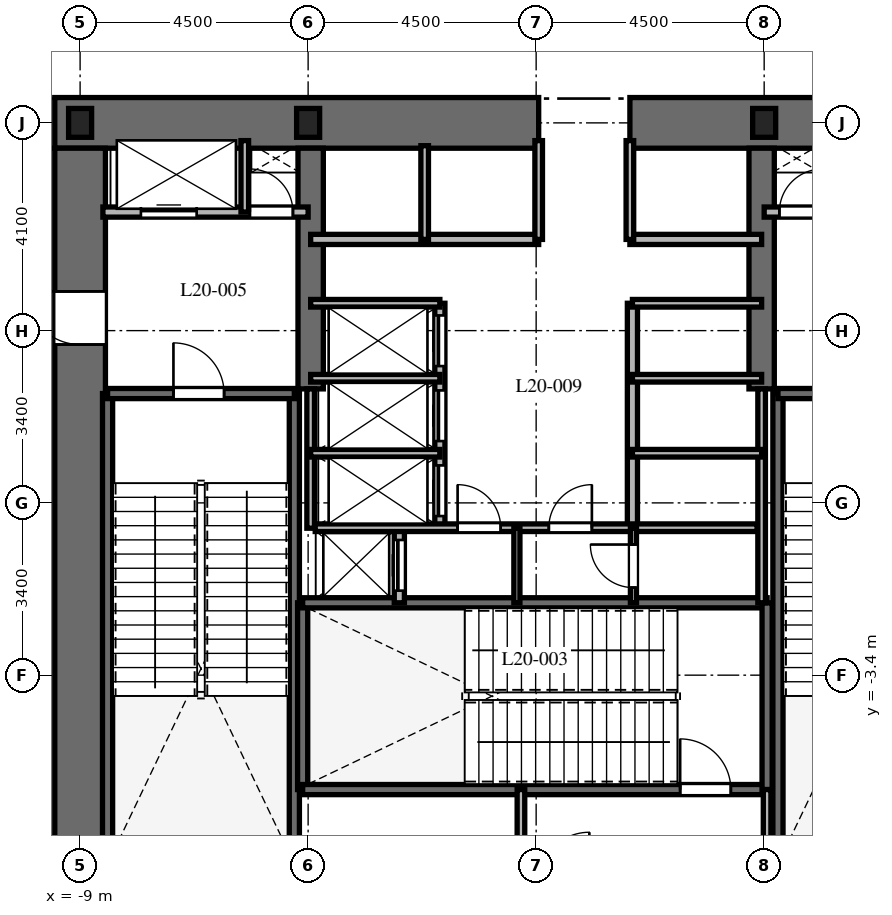
"""IFC4 building model, lengths in metres.
Left out: names, types, materials, properties, quantities, classifications, styles, units other than length and angle.
Written with IfcOpenShell. Run it as: python <this file> out.ifc"""

import sys

from ifc_helpers import new_model, si_unit, direction, frame, frame_2d, origin, origin_2d, place, context, subcontext, project, spatial, rectangle, i_section, extrude, element, fill, save


model = new_model("IFC4")
c1 = context("Model", 3, precision=1e-05, world=origin(), true_north=direction((0.0, 1.0)))
c2 = subcontext(c1, "Body", "Model", "MODEL_VIEW")
j1 = project(units=[si_unit("LENGTHUNIT", "METRE"), si_unit("PLANEANGLEUNIT", "RADIAN")], contexts=[c1])
p1 = place(None, origin())
s1 = spatial("IfcSite", under=j1, at=p1, CompositionType="ELEMENT")
p2 = place(p1, origin())
s2 = spatial("IfcBuilding", under=s1, at=p2, CompositionType="ELEMENT")
p3 = place(p2, frame((0.0, 0.0, 86.0)))
s3 = spatial("IfcBuildingStorey", under=s2, at=p3, CompositionType="ELEMENT", Elevation=86.0)
p4 = place(p3, frame((-9.5, 7.5, 0.0), z_axis=(0.0, 0.0, 1.0), x_axis=(1.0, 0.0, 0.0)))
e1 = element("IfcWall", 1, at=p4, inside=s3, PredefinedType="SHEAR", context=c2, shape_type="SweptSolid", body=[
    extrude(rectangle(XDim=9.55, YDim=1.0, at=frame_2d((4.775, 0.0))), origin(), (0.0, 0.0, 1.0), 5.4),
])
p5 = place(p3, frame((1.85, 7.5, 0.0), z_axis=(0.0, 0.0, 1.0), x_axis=(1.0, 0.0, 0.0)))
e2 = element("IfcWall", 2, at=p5, inside=s3, PredefinedType="SHEAR", context=c2, shape_type="SweptSolid", body=[
    extrude(rectangle(XDim=7.65, YDim=1.0, at=frame_2d((3.825, 0.0))), origin(), (0.0, 0.0, 1.0), 5.4),
])
p6 = place(p3, frame((-9.0, -7.0, 0.0), z_axis=(0.0, 0.0, 1.0), x_axis=(0.0, 1.0, 0.0)))
e3 = element("IfcWall", 3, at=p6, inside=s3, PredefinedType="SHEAR", context=c2, shape_type="SweptSolid", body=[
    extrude(rectangle(XDim=14.0, YDim=1.0, at=frame_2d((7.0, 0.0))), origin(), (0.0, 0.0, 1.0), 5.4),
])
p7 = place(p6, frame((10.125, 0.0, 0.0)))
e4 = element("IfcOpeningElement", 4, at=p7, cuts=e3, PredefinedType="OPENING", context=c2, shape_type="SweptSolid", body=[
    extrude(rectangle(XDim=1.05, YDim=2.15, at=frame_2d((0.525, 1.075))), frame((0.0, 0.51, 0.0), z_axis=(0.0, -1.0, 0.0), x_axis=(1.0, 0.0, 0.0)), (0.0, 0.0, 1.0), 1.02),
])
for number, where, z_axis, x_axis in (
    (5, (-4.45, 2.25, 0.0), (0.0, 0.0, 1.0), (0.0, 1.0, 0.0)),
    (6, (4.45, 2.25, 0.0), (0.0, 0.0, 1.0), (0.0, 1.0, 0.0)),
):
    element("IfcWall", number, at=place(p3, frame(where, z_axis=z_axis, x_axis=x_axis)), inside=s3, PredefinedType="SHEAR", context=c2, shape_type="SweptSolid", body=[
        extrude(rectangle(XDim=4.75, YDim=0.5, at=frame_2d((2.375, 0.0))), origin(), (0.0, 0.0, 1.0), 5.4),
    ])
for number, where, z_axis, x_axis in (
    (7, (-8.458, -6.985, 0.0), (0.0, 0.0, 1.0), (0.0, 1.0, 0.0)),
    (8, (-4.772, -6.985, 0.0), (0.0, 0.0, 1.0), (0.0, 1.0, 0.0)),
):
    element("IfcWall", number, at=place(p3, frame(where, z_axis=z_axis, x_axis=x_axis)), inside=s3, PredefinedType="SHEAR", context=c2, shape_type="SweptSolid", body=[
        extrude(rectangle(XDim=9.143, YDim=0.2, at=frame_2d((4.572, 0.0))), origin(), (0.0, 0.0, 1.0), 5.4),
    ])
p8 = place(p3, frame((-8.458, 2.158, 0.0), z_axis=(0.0, 0.0, 1.0), x_axis=(1.0, 0.0, 0.0)))
e9 = element("IfcWall", 9, at=p8, inside=s3, PredefinedType="SHEAR", context=c2, shape_type="SweptSolid", body=[
    extrude(rectangle(XDim=3.686, YDim=0.2, at=frame_2d((1.843, 0.0))), origin(), (0.0, 0.0, 1.0), 5.4),
])
p9 = place(p8, frame((1.3, 0.0, 0.0)))
e10 = element("IfcOpeningElement", 10, at=p9, cuts=e9, PredefinedType="OPENING", context=c2, shape_type="SweptSolid", body=[
    extrude(rectangle(XDim=1.0, YDim=2.15, at=frame_2d((0.5, 1.075))), frame((0.0, 0.11, 0.0), z_axis=(0.0, -1.0, 0.0), x_axis=(1.0, 0.0, 0.0)), (0.0, 0.0, 1.0), 0.22),
])
p10 = place(p3, frame((4.772, -6.985, 0.0), z_axis=(0.0, 0.0, 1.0), x_axis=(0.0, 1.0, 0.0)))
e11 = element("IfcWall", 11, at=p10, inside=s3, PredefinedType="SHEAR", context=c2, shape_type="SweptSolid", body=[
    extrude(rectangle(XDim=9.143, YDim=0.2, at=frame_2d((4.572, 0.0))), origin(), (0.0, 0.0, 1.0), 5.4),
])
p11 = place(p3, frame((4.772, 2.158, 0.0), z_axis=(0.0, 0.0, 1.0), x_axis=(1.0, 0.0, 0.0)))
e12 = element("IfcWall", 12, at=p11, inside=s3, PredefinedType="SHEAR", context=c2, shape_type="SweptSolid", body=[
    extrude(rectangle(XDim=3.686, YDim=0.2, at=frame_2d((1.843, 0.0))), origin(), (0.0, 0.0, 1.0), 5.4),
])
p12 = place(p11, frame((1.35, 0.0, 0.0)))
e13 = element("IfcOpeningElement", 13, at=p12, cuts=e12, PredefinedType="OPENING", context=c2, shape_type="SweptSolid", body=[
    extrude(rectangle(XDim=1.0, YDim=2.15, at=frame_2d((0.5, 1.075))), frame((0.0, 0.11, 0.0), z_axis=(0.0, -1.0, 0.0), x_axis=(1.0, 0.0, 0.0)), (0.0, 0.0, 1.0), 0.22),
])
p13 = place(p3, frame((-4.608, -5.658, 0.0), z_axis=(0.0, 0.0, 1.0), x_axis=(0.0, 1.0, 0.0)))
e14 = element("IfcWall", 14, at=p13, inside=s3, PredefinedType="SHEAR", context=c2, shape_type="SweptSolid", body=[
    extrude(rectangle(XDim=3.686, YDim=0.2, at=frame_2d((1.843, 0.0))), origin(), (0.0, 0.0, 1.0), 5.4),
])
p14 = place(p3, frame((-4.608, -5.658, 0.0), z_axis=(0.0, 0.0, 1.0), x_axis=(1.0, 0.0, 0.0)))
e15 = element("IfcWall", 15, at=p14, inside=s3, PredefinedType="SHEAR", context=c2, shape_type="SweptSolid", body=[
    extrude(rectangle(XDim=9.166, YDim=0.2, at=frame_2d((4.583, 0.0))), origin(), (0.0, 0.0, 1.0), 5.4),
])
p15 = place(p14, frame((7.45, 0.0, 0.0)))
e16 = element("IfcOpeningElement", 16, at=p15, cuts=e15, PredefinedType="OPENING", context=c2, shape_type="SweptSolid", body=[
    extrude(rectangle(XDim=1.0, YDim=2.15, at=frame_2d((0.5, 1.075))), frame((0.0, 0.11, 0.0), z_axis=(0.0, -1.0, 0.0), x_axis=(1.0, 0.0, 0.0)), (0.0, 0.0, 1.0), 0.22),
])
p16 = place(p3, frame((-4.608, -1.972, 0.0), z_axis=(0.0, 0.0, 1.0), x_axis=(1.0, 0.0, 0.0)))
e17 = element("IfcWall", 17, at=p16, inside=s3, PredefinedType="SHEAR", context=c2, shape_type="SweptSolid", body=[
    extrude(rectangle(XDim=9.166, YDim=0.2, at=frame_2d((4.583, 0.0))), origin(), (0.0, 0.0, 1.0), 5.4),
])
p17 = place(p3, frame((4.558, -5.658, 0.0), z_axis=(0.0, 0.0, 1.0), x_axis=(0.0, 1.0, 0.0)))
e18 = element("IfcWall", 18, at=p17, inside=s3, PredefinedType="SHEAR", context=c2, shape_type="SweptSolid", body=[
    extrude(rectangle(XDim=3.686, YDim=0.2, at=frame_2d((1.843, 0.0))), origin(), (0.0, 0.0, 1.0), 5.4),
])
for number, where, z_axis, x_axis in (
    (19, (4.5, 7.5, 0.0), (0.0, 0.0, 1.0), (1.0, 0.0, 0.0)),
    (20, (-4.5, 7.5, 0.0), (0.0, 0.0, 1.0), (1.0, 0.0, 0.0)),
    (21, (-9.0, 7.5, 0.0), (0.0, 0.0, 1.0), (1.0, 0.0, 0.0)),
):
    element("IfcColumn", number, at=place(p3, frame(where, z_axis=z_axis, x_axis=x_axis)), inside=s3, PredefinedType="COLUMN", context=c2, shape_type="SweptSolid", body=[
        extrude(i_section(OverallWidth=0.454, OverallDepth=0.569, WebThickness=0.078, FlangeThickness=0.125, at=origin_2d()), origin(), (0.0, 0.0, 1.0), 5.4),
    ])
for number, where, z_axis, x_axis in (
    (22, (-0.3, -7.02, 0.0), (0.0, 0.0, 1.0), (0.0, 1.0, 0.0)),
    (23, (4.558, -7.02, 0.0), (0.0, 0.0, 1.0), (0.0, 1.0, 0.0)),
):
    element("IfcWall", number, at=place(p3, frame(where, z_axis=z_axis, x_axis=x_axis)), inside=s3, PredefinedType="PARTITIONING", context=c2, shape_type="SweptSolid", body=[
        extrude(rectangle(XDim=1.362, YDim=0.15, at=frame_2d((0.681, 0.0))), origin(), (0.0, 0.0, 1.0), 5.1),
    ])
p18 = place(p3, frame((-8.55, 5.74, 0.0), z_axis=(0.0, 0.0, 1.0), x_axis=(1.0, 0.0, 0.0)))
e24 = element("IfcWall", 24, at=p18, inside=s3, PredefinedType="PARTITIONING", context=c2, shape_type="SweptSolid", body=[
    extrude(rectangle(XDim=4.05, YDim=0.2, at=frame_2d((2.025, 0.0))), origin(), (0.0, 0.0, 1.0), 5.1),
])
p19 = place(p18, frame((0.75, 0.0, 0.0)))
e25 = element("IfcOpeningElement", 25, at=p19, cuts=e24, PredefinedType="OPENING", context=c2, shape_type="SweptSolid", body=[
    extrude(rectangle(XDim=1.1, YDim=2.2, at=frame_2d((0.55, 1.1))), frame((0.0, 0.11, 0.0), z_axis=(0.0, -1.0, 0.0), x_axis=(1.0, 0.0, 0.0)), (0.0, 0.0, 1.0), 0.22),
])
p20 = place(p18, frame((2.9, 0.0, 0.0)))
e26 = element("IfcOpeningElement", 26, at=p20, cuts=e24, PredefinedType="OPENING", context=c2, shape_type="SweptSolid", body=[
    extrude(rectangle(XDim=0.85, YDim=2.03, at=frame_2d((0.425, 1.015))), frame((0.0, 0.11, 0.0), z_axis=(0.0, -1.0, 0.0), x_axis=(1.0, 0.0, 0.0)), (0.0, 0.0, 1.0), 0.22),
])
p21 = place(p3, frame((-5.75, 5.74, 0.0), z_axis=(0.0, 0.0, 1.0), x_axis=(0.0, 1.0, 0.0)))
e27 = element("IfcWall", 27, at=p21, inside=s3, PredefinedType="PARTITIONING", context=c2, shape_type="SweptSolid", body=[
    extrude(rectangle(XDim=1.41, YDim=0.15, at=frame_2d((0.705, 0.0))), origin(), (0.0, 0.0, 1.0), 5.1),
])
p22 = place(p3, frame((4.5, 5.74, 0.0), z_axis=(0.0, 0.0, 1.0), x_axis=(1.0, 0.0, 0.0)))
e28 = element("IfcWall", 28, at=p22, inside=s3, PredefinedType="PARTITIONING", context=c2, shape_type="SweptSolid", body=[
    extrude(rectangle(XDim=4.05, YDim=0.2, at=frame_2d((2.025, 0.0))), origin(), (0.0, 0.0, 1.0), 5.1),
])
p23 = place(p22, frame((0.3, 0.0, 0.0)))
e29 = element("IfcOpeningElement", 29, at=p23, cuts=e28, PredefinedType="OPENING", context=c2, shape_type="SweptSolid", body=[
    extrude(rectangle(XDim=0.85, YDim=2.03, at=frame_2d((0.425, 1.015))), frame((0.0, 0.11, 0.0), z_axis=(0.0, -1.0, 0.0), x_axis=(1.0, 0.0, 0.0)), (0.0, 0.0, 1.0), 0.22),
])
p24 = place(p22, frame((2.15, 0.0, 0.0)))
e30 = element("IfcOpeningElement", 30, at=p24, cuts=e28, PredefinedType="OPENING", context=c2, shape_type="SweptSolid", body=[
    extrude(rectangle(XDim=1.1, YDim=2.2, at=frame_2d((0.55, 1.1))), frame((0.0, 0.11, 0.0), z_axis=(0.0, -1.0, 0.0), x_axis=(1.0, 0.0, 0.0)), (0.0, 0.0, 1.0), 0.22),
])
p25 = place(p3, frame((-2.7, -1.972, 0.0), z_axis=(0.0, 0.0, 1.0), x_axis=(0.0, 1.0, 0.0)))
e31 = element("IfcWall", 31, at=p25, inside=s3, PredefinedType="PARTITIONING", context=c2, shape_type="SweptSolid", body=[
    extrude(rectangle(XDim=1.472, YDim=0.2, at=frame_2d((0.736, 0.0))), origin(), (0.0, 0.0, 1.0), 5.1),
])
p26 = place(p25, frame((0.24, 0.0, 0.0)))
e32 = element("IfcOpeningElement", 32, at=p26, cuts=e31, PredefinedType="OPENING", context=c2, shape_type="SweptSolid", body=[
    extrude(rectangle(XDim=1.0, YDim=2.2, at=frame_2d((0.5, 1.1))), frame((0.0, 0.11, 0.0), z_axis=(0.0, -1.0, 0.0), x_axis=(1.0, 0.0, 0.0)), (0.0, 0.0, 1.0), 0.22),
])
p27 = place(p3, frame((-4.45, 5.2, 0.0), z_axis=(0.0, 0.0, 1.0), x_axis=(1.0, 0.0, 0.0)))
e33 = element("IfcWall", 33, at=p27, inside=s3, PredefinedType="PARTITIONING", context=c2, shape_type="SweptSolid", body=[
    extrude(rectangle(XDim=4.5, YDim=0.2, at=frame_2d((2.25, 0.0))), origin(), (0.0, 0.0, 1.0), 5.1),
])
p28 = place(p3, frame((1.85, 5.2, 0.0), z_axis=(0.0, 0.0, 1.0), x_axis=(1.0, 0.0, 0.0)))
e34 = element("IfcWall", 34, at=p28, inside=s3, PredefinedType="PARTITIONING", context=c2, shape_type="SweptSolid", body=[
    extrude(rectangle(XDim=2.6, YDim=0.2, at=frame_2d((1.3, 0.0))), origin(), (0.0, 0.0, 1.0), 5.1),
])
p29 = place(p3, frame((-2.2, 5.2, 0.0), z_axis=(0.0, 0.0, 1.0), x_axis=(0.0, 1.0, 0.0)))
e35 = element("IfcWall", 35, at=p29, inside=s3, PredefinedType="PARTITIONING", context=c2, shape_type="SweptSolid", body=[
    extrude(rectangle(XDim=1.85, YDim=0.15, at=frame_2d((0.925, 0.0))), origin(), (0.0, 0.0, 1.0), 5.1),
])
for number, where, z_axis, x_axis in (
    (36, (0.05, 5.2, 0.0), (0.0, 0.0, 1.0), (0.0, 1.0, 0.0)),
    (37, (1.85, 5.2, 0.0), (0.0, 0.0, 1.0), (0.0, 1.0, 0.0)),
):
    element("IfcWall", number, at=place(p3, frame(where, z_axis=z_axis, x_axis=x_axis)), inside=s3, PredefinedType="PARTITIONING", context=c2, shape_type="SweptSolid", body=[
        extrude(rectangle(XDim=1.95, YDim=0.15, at=frame_2d((0.975, 0.0))), origin(), (0.0, 0.0, 1.0), 5.1),
    ])
p30 = place(p3, frame((-4.45, -0.5, 0.0), z_axis=(0.0, 0.0, 1.0), x_axis=(0.0, 1.0, 0.0)))
e38 = element("IfcWall", 38, at=p30, inside=s3, PredefinedType="PARTITIONING", context=c2, shape_type="SweptSolid", body=[
    extrude(rectangle(XDim=2.75, YDim=0.15, at=frame_2d((1.375, 0.0))), origin(), (0.0, 0.0, 1.0), 5.1),
])
p31 = place(p3, frame((4.45, -1.972, 0.0), z_axis=(0.0, 0.0, 1.0), x_axis=(0.0, 1.0, 0.0)))
e39 = element("IfcWall", 39, at=p31, inside=s3, PredefinedType="PARTITIONING", context=c2, shape_type="SweptSolid", body=[
    extrude(rectangle(XDim=4.222, YDim=0.15, at=frame_2d((2.111, 0.0))), origin(), (0.0, 0.0, 1.0), 5.1),
])
p32 = place(p3, frame((-1.9, -0.5, 0.0), z_axis=(0.0, 0.0, 1.0), x_axis=(0.0, 1.0, 0.0)))
e40 = element("IfcWall", 40, at=p32, inside=s3, PredefinedType="PARTITIONING", context=c2, shape_type="SweptSolid", body=[
    extrude(rectangle(XDim=4.44, YDim=0.2, at=frame_2d((2.22, 0.0))), origin(), (0.0, 0.0, 1.0), 5.1),
])
p33 = place(p32, frame((0.24, 0.0, 0.0)))
e41 = element("IfcOpeningElement", 41, at=p33, cuts=e40, PredefinedType="OPENING", context=c2, shape_type="SweptSolid", body=[
    extrude(rectangle(XDim=1.0, YDim=2.2, at=frame_2d((0.5, 1.1))), frame((0.0, 0.11, 0.0), z_axis=(0.0, -1.0, 0.0), x_axis=(1.0, 0.0, 0.0)), (0.0, 0.0, 1.0), 0.22),
])
p34 = place(p32, frame((1.72, 0.0, 0.0)))
e42 = element("IfcOpeningElement", 42, at=p34, cuts=e40, PredefinedType="OPENING", context=c2, shape_type="SweptSolid", body=[
    extrude(rectangle(XDim=1.0, YDim=2.2, at=frame_2d((0.5, 1.1))), frame((0.0, 0.11, 0.0), z_axis=(0.0, -1.0, 0.0), x_axis=(1.0, 0.0, 0.0)), (0.0, 0.0, 1.0), 0.22),
])
p35 = place(p32, frame((3.2, 0.0, 0.0)))
e43 = element("IfcOpeningElement", 43, at=p35, cuts=e40, PredefinedType="OPENING", context=c2, shape_type="SweptSolid", body=[
    extrude(rectangle(XDim=1.0, YDim=2.2, at=frame_2d((0.5, 1.1))), frame((0.0, 0.11, 0.0), z_axis=(0.0, -1.0, 0.0), x_axis=(1.0, 0.0, 0.0)), (0.0, 0.0, 1.0), 0.22),
])
for number, where, z_axis, x_axis in (
    (44, (-4.45, 3.94, 0.0), (0.0, 0.0, 1.0), (1.0, 0.0, 0.0)),
    (45, (-4.45, 0.98, 0.0), (0.0, 0.0, 1.0), (1.0, 0.0, 0.0)),
    (46, (-4.45, 2.46, 0.0), (0.0, 0.0, 1.0), (1.0, 0.0, 0.0)),
):
    element("IfcWall", number, at=place(p3, frame(where, z_axis=z_axis, x_axis=x_axis)), inside=s3, PredefinedType="PARTITIONING", context=c2, shape_type="SweptSolid", body=[
        extrude(rectangle(XDim=2.55, YDim=0.15, at=frame_2d((1.275, 0.0))), origin(), (0.0, 0.0, 1.0), 5.1),
    ])
p36 = place(p3, frame((1.9, -0.5, 0.0), z_axis=(0.0, 0.0, 1.0), x_axis=(0.0, 1.0, 0.0)))
e47 = element("IfcWall", 47, at=p36, inside=s3, PredefinedType="PARTITIONING", context=c2, shape_type="SweptSolid", body=[
    extrude(rectangle(XDim=4.44, YDim=0.2, at=frame_2d((2.22, 0.0))), origin(), (0.0, 0.0, 1.0), 5.1),
])
for number, where, z_axis, x_axis in (
    (48, (1.9, 3.94, 0.0), (0.0, 0.0, 1.0), (1.0, 0.0, 0.0)),
    (49, (1.9, 0.98, 0.0), (0.0, 0.0, 1.0), (1.0, 0.0, 0.0)),
    (50, (1.9, 2.46, 0.0), (0.0, 0.0, 1.0), (1.0, 0.0, 0.0)),
):
    element("IfcWall", number, at=place(p3, frame(where, z_axis=z_axis, x_axis=x_axis)), inside=s3, PredefinedType="PARTITIONING", context=c2, shape_type="SweptSolid", body=[
        extrude(rectangle(XDim=2.55, YDim=0.15, at=frame_2d((1.275, 0.0))), origin(), (0.0, 0.0, 1.0), 5.1),
    ])
p37 = place(p3, frame((-4.36, -0.49, 0.0), z_axis=(0.0, 0.0, 1.0), x_axis=(1.0, 0.0, 0.0)))
e51 = element("IfcWall", 51, at=p37, inside=s3, PredefinedType="PARTITIONING", context=c2, shape_type="SweptSolid", body=[
    extrude(rectangle(XDim=8.72, YDim=0.15, at=frame_2d((4.36, 0.0))), origin(), (0.0, 0.0, 1.0), 5.1),
])
p38 = place(p37, frame((2.81, 0.0, 0.0)))
e52 = element("IfcOpeningElement", 52, at=p38, cuts=e51, PredefinedType="OPENING", context=c2, shape_type="SweptSolid", body=[
    extrude(rectangle(XDim=0.85, YDim=2.03, at=frame_2d((0.425, 1.015))), frame((0.0, 0.085, 0.0), z_axis=(0.0, -1.0, 0.0), x_axis=(1.0, 0.0, 0.0)), (0.0, 0.0, 1.0), 0.17),
])
p39 = place(p37, frame((4.61, 0.0, 0.0)))
e53 = element("IfcOpeningElement", 53, at=p39, cuts=e51, PredefinedType="OPENING", context=c2, shape_type="SweptSolid", body=[
    extrude(rectangle(XDim=0.85, YDim=2.03, at=frame_2d((0.425, 1.015))), frame((0.0, 0.085, 0.0), z_axis=(0.0, -1.0, 0.0), x_axis=(1.0, 0.0, 0.0)), (0.0, 0.0, 1.0), 0.17),
])
p40 = place(p3, frame((-0.38, -1.972, 0.0), z_axis=(0.0, 0.0, 1.0), x_axis=(0.0, 1.0, 0.0)))
e54 = element("IfcWall", 54, at=p40, inside=s3, PredefinedType="PARTITIONING", context=c2, shape_type="SweptSolid", body=[
    extrude(rectangle(XDim=1.472, YDim=0.12, at=frame_2d((0.736, 0.0))), origin(), (0.0, 0.0, 1.0), 5.1),
])
p41 = place(p3, frame((1.92, -1.972, 0.0), z_axis=(0.0, 0.0, 1.0), x_axis=(0.0, 1.0, 0.0)))
e55 = element("IfcWall", 55, at=p41, inside=s3, PredefinedType="PARTITIONING", context=c2, shape_type="SweptSolid", body=[
    extrude(rectangle(XDim=1.472, YDim=0.12, at=frame_2d((0.736, 0.0))), origin(), (0.0, 0.0, 1.0), 5.1),
])
p42 = place(p41, frame((0.3, 0.0, 0.0)))
e56 = element("IfcOpeningElement", 56, at=p42, cuts=e55, PredefinedType="OPENING", context=c2, shape_type="SweptSolid", body=[
    extrude(rectangle(XDim=0.85, YDim=2.03, at=frame_2d((0.425, 1.015))), frame((0.0, 0.07, 0.0), z_axis=(0.0, -1.0, 0.0), x_axis=(1.0, 0.0, 0.0)), (0.0, 0.0, 1.0), 0.14),
])
p43 = place(p9, origin())
e57 = element("IfcDoor", 57, at=p43, inside=s3, OperationType="SINGLE_SWING_LEFT", PredefinedType="DOOR", context=c2, shape_type="SweptSolid", body=[
    extrude(rectangle(XDim=1.0, YDim=2.15, at=frame_2d((0.5, 1.075))), frame((0.0, 0.025, 0.0), z_axis=(0.0, -1.0, 0.0), x_axis=(1.0, 0.0, 0.0)), (0.0, 0.0, 1.0), 0.05),
])
fill(e10, e57)
p44 = place(p15, origin())
e58 = element("IfcDoor", 58, at=p44, inside=s3, OperationType="SINGLE_SWING_LEFT", PredefinedType="DOOR", context=c2, shape_type="SweptSolid", body=[
    extrude(rectangle(XDim=1.0, YDim=2.15, at=frame_2d((0.5, 1.075))), frame((0.0, 0.025, 0.0), z_axis=(0.0, -1.0, 0.0), x_axis=(1.0, 0.0, 0.0)), (0.0, 0.0, 1.0), 0.05),
])
fill(e16, e58)
p45 = place(p7, origin())
e59 = element("IfcDoor", 59, at=p45, inside=s3, OperationType="SINGLE_SWING_RIGHT", PredefinedType="DOOR", context=c2, shape_type="SweptSolid", body=[
    extrude(rectangle(XDim=1.05, YDim=2.15, at=frame_2d((0.525, 1.075))), frame((0.0, 0.025, 0.0), z_axis=(0.0, -1.0, 0.0), x_axis=(1.0, 0.0, 0.0)), (0.0, 0.0, 1.0), 0.05),
])
fill(e4, e59)
p46 = place(p19, origin())
e60 = element("IfcDoor", 60, at=p46, inside=s3, OperationType="SLIDING_TO_LEFT", PredefinedType="DOOR", context=c2, shape_type="SweptSolid", body=[
    extrude(rectangle(XDim=1.1, YDim=2.2, at=frame_2d((0.55, 1.1))), frame((0.0, 0.025, 0.0), z_axis=(0.0, -1.0, 0.0), x_axis=(1.0, 0.0, 0.0)), (0.0, 0.0, 1.0), 0.05),
])
fill(e25, e60)
p47 = place(p20, origin())
e61 = element("IfcDoor", 61, at=p47, inside=s3, OperationType="SINGLE_SWING_LEFT", PredefinedType="DOOR", context=c2, shape_type="SweptSolid", body=[
    extrude(rectangle(XDim=0.85, YDim=2.03, at=frame_2d((0.425, 1.015))), frame((0.0, 0.025, 0.0), z_axis=(0.0, -1.0, 0.0), x_axis=(1.0, 0.0, 0.0)), (0.0, 0.0, 1.0), 0.05),
])
fill(e26, e61)
p48 = place(p23, origin())
e62 = element("IfcDoor", 62, at=p48, inside=s3, OperationType="SINGLE_SWING_RIGHT", PredefinedType="DOOR", context=c2, shape_type="SweptSolid", body=[
    extrude(rectangle(XDim=0.85, YDim=2.03, at=frame_2d((0.425, 1.015))), frame((0.0, 0.025, 0.0), z_axis=(0.0, -1.0, 0.0), x_axis=(1.0, 0.0, 0.0)), (0.0, 0.0, 1.0), 0.05),
])
fill(e29, e62)
p49 = place(p26, origin())
e63 = element("IfcDoor", 63, at=p49, inside=s3, OperationType="SLIDING_TO_LEFT", PredefinedType="DOOR", context=c2, shape_type="SweptSolid", body=[
    extrude(rectangle(XDim=1.0, YDim=2.2, at=frame_2d((0.5, 1.1))), frame((0.0, 0.025, 0.0), z_axis=(0.0, -1.0, 0.0), x_axis=(1.0, 0.0, 0.0)), (0.0, 0.0, 1.0), 0.05),
])
fill(e32, e63)
p50 = place(p33, origin())
e64 = element("IfcDoor", 64, at=p50, inside=s3, OperationType="SLIDING_TO_LEFT", PredefinedType="DOOR", context=c2, shape_type="SweptSolid", body=[
    extrude(rectangle(XDim=1.0, YDim=2.2, at=frame_2d((0.5, 1.1))), frame((0.0, 0.025, 0.0), z_axis=(0.0, -1.0, 0.0), x_axis=(1.0, 0.0, 0.0)), (0.0, 0.0, 1.0), 0.05),
])
fill(e41, e64)
p51 = place(p34, origin())
e65 = element("IfcDoor", 65, at=p51, inside=s3, OperationType="SLIDING_TO_LEFT", PredefinedType="DOOR", context=c2, shape_type="SweptSolid", body=[
    extrude(rectangle(XDim=1.0, YDim=2.2, at=frame_2d((0.5, 1.1))), frame((0.0, 0.025, 0.0), z_axis=(0.0, -1.0, 0.0), x_axis=(1.0, 0.0, 0.0)), (0.0, 0.0, 1.0), 0.05),
])
fill(e42, e65)
p52 = place(p35, origin())
e66 = element("IfcDoor", 66, at=p52, inside=s3, OperationType="SLIDING_TO_LEFT", PredefinedType="DOOR", context=c2, shape_type="SweptSolid", body=[
    extrude(rectangle(XDim=1.0, YDim=2.2, at=frame_2d((0.5, 1.1))), frame((0.0, 0.025, 0.0), z_axis=(0.0, -1.0, 0.0), x_axis=(1.0, 0.0, 0.0)), (0.0, 0.0, 1.0), 0.05),
])
fill(e43, e66)
p53 = place(p38, origin())
e67 = element("IfcDoor", 67, at=p53, inside=s3, OperationType="SINGLE_SWING_LEFT", PredefinedType="DOOR", context=c2, shape_type="SweptSolid", body=[
    extrude(rectangle(XDim=0.85, YDim=2.03, at=frame_2d((0.425, 1.015))), frame((0.0, 0.025, 0.0), z_axis=(0.0, -1.0, 0.0), x_axis=(1.0, 0.0, 0.0)), (0.0, 0.0, 1.0), 0.05),
])
fill(e52, e67)
p54 = place(p39, origin())
e68 = element("IfcDoor", 68, at=p54, inside=s3, OperationType="SINGLE_SWING_RIGHT", PredefinedType="DOOR", context=c2, shape_type="SweptSolid", body=[
    extrude(rectangle(XDim=0.85, YDim=2.03, at=frame_2d((0.425, 1.015))), frame((0.0, 0.025, 0.0), z_axis=(0.0, -1.0, 0.0), x_axis=(1.0, 0.0, 0.0)), (0.0, 0.0, 1.0), 0.05),
])
fill(e53, e68)
p55 = place(p42, origin())
e69 = element("IfcDoor", 69, at=p55, inside=s3, OperationType="SINGLE_SWING_RIGHT", PredefinedType="DOOR", context=c2, shape_type="SweptSolid", body=[
    extrude(rectangle(XDim=0.85, YDim=2.03, at=frame_2d((0.425, 1.015))), frame((0.0, 0.025, 0.0), z_axis=(0.0, -1.0, 0.0), x_axis=(1.0, 0.0, 0.0)), (0.0, 0.0, 1.0), 0.05),
])
fill(e56, e69)
save(model, sys.argv[1])
